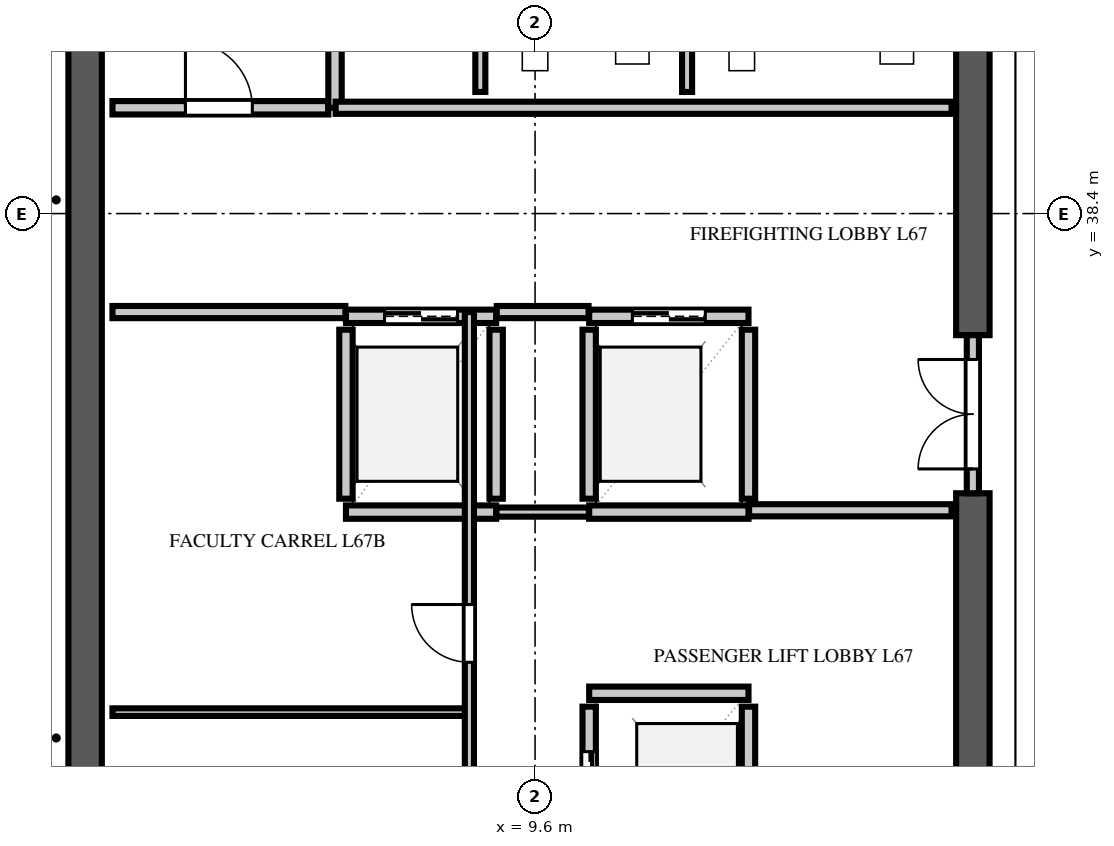
"""IFC4 building model, lengths in metres.
Left out: names, types, materials, properties, quantities, classifications, styles, units other than length and angle.
Written with IfcOpenShell. Run it as: python <this file> out.ifc"""

import sys

from ifc_helpers import new_model, si_unit, direction, frame, frame_2d, origin, place, context, subcontext, project, spatial, rectangle, extrude, element, fill, save


model = new_model("IFC4")
c1 = context("Model", 3, precision=1e-05, world=origin(), true_north=direction((0.0, 1.0)))
c2 = subcontext(c1, "Body", "Model", "MODEL_VIEW")
j1 = project(units=[si_unit("LENGTHUNIT", "METRE"), si_unit("PLANEANGLEUNIT", "RADIAN")], contexts=[c1])
p1 = place(None, origin())
s1 = spatial("IfcSite", under=j1, at=p1, CompositionType="ELEMENT")
p2 = place(p1, origin())
s2 = spatial("IfcBuilding", under=s1, at=p2, CompositionType="ELEMENT")
p3 = place(p2, frame((0.0, 0.0, 265.8)))
s3 = spatial("IfcBuildingStorey", under=s2, at=p3, CompositionType="ELEMENT", Elevation=265.8)
p4 = place(p3, frame((2.2, 9.325, 0.0), z_axis=(0.0, 0.0, 1.0), x_axis=(0.0, 1.0, 0.0)))
e1 = element("IfcWall", 1, at=p4, inside=s3, PredefinedType="SHEAR", context=c2, shape_type="SweptSolid", body=[
    extrude(rectangle(XDim=38.95, YDim=0.55, at=frame_2d((19.475, 0.0))), origin(), (0.0, 0.0, 1.0), 3.54),
])
p5 = place(p3, frame((16.8, 26.0, 0.0), z_axis=(0.0, 0.0, 1.0), x_axis=(0.0, 1.0, 0.0)))
e2 = element("IfcWall", 2, at=p5, inside=s3, PredefinedType="SHEAR", context=c2, shape_type="SweptSolid", body=[
    extrude(rectangle(XDim=7.8, YDim=0.55, at=frame_2d((3.9, 0.0))), origin(), (0.0, 0.0, 1.0), 3.54),
])
p6 = place(p3, frame((16.8, 36.4, 0.0), z_axis=(0.0, 0.0, 1.0), x_axis=(0.0, 1.0, 0.0)))
e3 = element("IfcWall", 3, at=p6, inside=s3, PredefinedType="SHEAR", context=c2, shape_type="SweptSolid", body=[
    extrude(rectangle(XDim=11.325, YDim=0.55, at=frame_2d((5.663, 0.0))), origin(), (0.0, 0.0, 1.0), 3.54),
])
p7 = place(p6, frame((9.2, 0.0, 0.0)))
e4 = element("IfcOpeningElement", 4, at=p7, cuts=e3, PredefinedType="OPENING", context=c2, shape_type="SweptSolid", body=[
    extrude(rectangle(XDim=0.95, YDim=2.15, at=frame_2d((0.475, 1.075))), frame((0.0, 0.287, 0.0), z_axis=(0.0, -1.0, 0.0), x_axis=(1.0, 0.0, 0.0)), (0.0, 0.0, 1.0), 0.574),
])
p8 = place(p3, frame((2.65, 40.14, 0.0), z_axis=(0.0, 0.0, 1.0), x_axis=(1.0, 0.0, 0.0)))
e5 = element("IfcWall", 5, at=p8, inside=s3, PredefinedType="SOLIDWALL", context=c2, shape_type="SweptSolid", body=[
    extrude(rectangle(XDim=3.55, YDim=0.22, at=frame_2d((1.775, 0.0))), origin(), (0.0, 0.0, 1.0), 3.54),
])
p9 = place(p8, frame((1.2, 0.0, 0.0)))
e6 = element("IfcOpeningElement", 6, at=p9, cuts=e5, PredefinedType="OPENING", context=c2, shape_type="SweptSolid", body=[
    extrude(rectangle(XDim=1.1, YDim=2.2, at=frame_2d((0.55, 1.1))), frame((0.0, 0.122, 0.0), z_axis=(0.0, -1.0, 0.0), x_axis=(1.0, 0.0, 0.0)), (0.0, 0.0, 1.0), 0.244),
])
p10 = place(p3, frame((6.31, 40.14, 0.0), z_axis=(0.0, 0.0, 1.0), x_axis=(0.0, 1.0, 0.0)))
e7 = element("IfcWall", 7, at=p10, inside=s3, PredefinedType="SOLIDWALL", context=c2, shape_type="SweptSolid", body=[
    extrude(rectangle(XDim=7.81, YDim=0.22, at=frame_2d((3.905, 0.0))), origin(), (0.0, 0.0, 1.0), 3.54),
])
p11 = place(p3, frame((10.49, 27.71, 0.0), z_axis=(0.0, 0.0, 1.0), x_axis=(0.0, 1.0, 0.0)))
e8 = element("IfcWall", 8, at=p11, inside=s3, PredefinedType="SOLIDWALL", context=c2, shape_type="SweptSolid", body=[
    extrude(rectangle(XDim=2.58, YDim=0.22, at=frame_2d((1.29, 0.0))), origin(), (0.0, 0.0, 1.0), 3.54),
])
p12 = place(p11, frame((0.74, 0.0, 0.0)))
e9 = element("IfcOpeningElement", 9, at=p12, cuts=e8, PredefinedType="OPENING", context=c2, shape_type="SweptSolid", body=[
    extrude(rectangle(XDim=1.1, YDim=2.2, at=frame_2d((0.55, 1.1))), frame((0.0, 0.122, 0.0), z_axis=(0.0, -1.0, 0.0), x_axis=(1.0, 0.0, 0.0)), (0.0, 0.0, 1.0), 0.244),
])
p13 = place(p3, frame((13.11, 27.71, 0.0), z_axis=(0.0, 0.0, 1.0), x_axis=(0.0, 1.0, 0.0)))
e10 = element("IfcWall", 10, at=p13, inside=s3, PredefinedType="SOLIDWALL", context=c2, shape_type="SweptSolid", body=[
    extrude(rectangle(XDim=2.58, YDim=0.22, at=frame_2d((1.29, 0.0))), origin(), (0.0, 0.0, 1.0), 3.54),
])
p14 = place(p3, frame((10.49, 30.51, 0.0), z_axis=(0.0, 0.0, 1.0), x_axis=(1.0, 0.0, 0.0)))
e11 = element("IfcWall", 11, at=p14, inside=s3, PredefinedType="SOLIDWALL", context=c2, shape_type="SweptSolid", body=[
    extrude(rectangle(XDim=2.62, YDim=0.22, at=frame_2d((1.31, 0.0))), origin(), (0.0, 0.0, 1.0), 3.54),
])
for number, where, z_axis, x_axis in (
    (12, (6.49, 33.71, 0.0), (0.0, 0.0, 1.0), (0.0, 1.0, 0.0)),
    (13, (8.96, 33.71, 0.0), (0.0, 0.0, 1.0), (0.0, 1.0, 0.0)),
):
    element("IfcWall", number, at=place(p3, frame(where, z_axis=z_axis, x_axis=x_axis)), inside=s3, PredefinedType="SOLIDWALL", context=c2, shape_type="SweptSolid", body=[
        extrude(rectangle(XDim=2.78, YDim=0.22, at=frame_2d((1.39, 0.0))), origin(), (0.0, 0.0, 1.0), 3.54),
    ])
p15 = place(p3, frame((6.49, 33.49, 0.0), z_axis=(0.0, 0.0, 1.0), x_axis=(1.0, 0.0, 0.0)))
e14 = element("IfcWall", 14, at=p15, inside=s3, PredefinedType="SOLIDWALL", context=c2, shape_type="SweptSolid", body=[
    extrude(rectangle(XDim=2.47, YDim=0.22, at=frame_2d((1.235, 0.0))), origin(), (0.0, 0.0, 1.0), 3.54),
])
p16 = place(p3, frame((6.49, 36.71, 0.0), z_axis=(0.0, 0.0, 1.0), x_axis=(1.0, 0.0, 0.0)))
e15 = element("IfcWall", 15, at=p16, inside=s3, PredefinedType="SOLIDWALL", context=c2, shape_type="SweptSolid", body=[
    extrude(rectangle(XDim=2.47, YDim=0.22, at=frame_2d((1.235, 0.0))), origin(), (0.0, 0.0, 1.0), 3.54),
])
p17 = place(p16, frame((0.635, 0.0, 0.0)))
e16 = element("IfcOpeningElement", 16, at=p17, cuts=e15, PredefinedType="OPENING", context=c2, shape_type="SweptSolid", body=[
    extrude(rectangle(XDim=1.2, YDim=2.2, at=frame_2d((0.6, 1.1))), frame((0.0, 0.122, 0.0), z_axis=(0.0, -1.0, 0.0), x_axis=(1.0, 0.0, 0.0)), (0.0, 0.0, 1.0), 0.244),
])
for number, where, z_axis, x_axis in (
    (17, (10.49, 33.71, 0.0), (0.0, 0.0, 1.0), (0.0, 1.0, 0.0)),
    (18, (13.11, 33.71, 0.0), (0.0, 0.0, 1.0), (0.0, 1.0, 0.0)),
):
    element("IfcWall", number, at=place(p3, frame(where, z_axis=z_axis, x_axis=x_axis)), inside=s3, PredefinedType="SOLIDWALL", context=c2, shape_type="SweptSolid", body=[
        extrude(rectangle(XDim=2.78, YDim=0.22, at=frame_2d((1.39, 0.0))), origin(), (0.0, 0.0, 1.0), 3.54),
    ])
p18 = place(p3, frame((10.49, 33.49, 0.0), z_axis=(0.0, 0.0, 1.0), x_axis=(1.0, 0.0, 0.0)))
e19 = element("IfcWall", 19, at=p18, inside=s3, PredefinedType="SOLIDWALL", context=c2, shape_type="SweptSolid", body=[
    extrude(rectangle(XDim=2.62, YDim=0.22, at=frame_2d((1.31, 0.0))), origin(), (0.0, 0.0, 1.0), 3.54),
])
p19 = place(p3, frame((10.49, 36.71, 0.0), z_axis=(0.0, 0.0, 1.0), x_axis=(1.0, 0.0, 0.0)))
e20 = element("IfcWall", 20, at=p19, inside=s3, PredefinedType="SOLIDWALL", context=c2, shape_type="SweptSolid", body=[
    extrude(rectangle(XDim=2.62, YDim=0.22, at=frame_2d((1.31, 0.0))), origin(), (0.0, 0.0, 1.0), 3.54),
])
p20 = place(p19, frame((0.71, 0.0, 0.0)))
e21 = element("IfcOpeningElement", 21, at=p20, cuts=e20, PredefinedType="OPENING", context=c2, shape_type="SweptSolid", body=[
    extrude(rectangle(XDim=1.2, YDim=2.2, at=frame_2d((0.6, 1.1))), frame((0.0, 0.122, 0.0), z_axis=(0.0, -1.0, 0.0), x_axis=(1.0, 0.0, 0.0)), (0.0, 0.0, 1.0), 0.244),
])
p21 = place(p3, frame((2.65, 36.78, 0.0), z_axis=(0.0, 0.0, 1.0), x_axis=(1.0, 0.0, 0.0)))
e22 = element("IfcWall", 22, at=p21, inside=s3, PredefinedType="SOLIDWALL", context=c2, shape_type="SweptSolid", body=[
    extrude(rectangle(XDim=3.83, YDim=0.2, at=frame_2d((1.915, 0.0))), origin(), (0.0, 0.0, 1.0), 3.54),
])
p22 = place(p3, frame((8.97, 36.78, 0.0), z_axis=(0.0, 0.0, 1.0), x_axis=(1.0, 0.0, 0.0)))
e23 = element("IfcWall", 23, at=p22, inside=s3, PredefinedType="SOLIDWALL", context=c2, shape_type="SweptSolid", body=[
    extrude(rectangle(XDim=1.51, YDim=0.2, at=frame_2d((0.755, 0.0))), origin(), (0.0, 0.0, 1.0), 3.54),
])
p23 = place(p3, frame((13.12, 33.52, 0.0), z_axis=(0.0, 0.0, 1.0), x_axis=(1.0, 0.0, 0.0)))
e24 = element("IfcWall", 24, at=p23, inside=s3, PredefinedType="SOLIDWALL", context=c2, shape_type="SweptSolid", body=[
    extrude(rectangle(XDim=3.33, YDim=0.2, at=frame_2d((1.665, 0.0))), origin(), (0.0, 0.0, 1.0), 3.54),
])
p24 = place(p3, frame((6.32, 40.14, 0.0), z_axis=(0.0, 0.0, 1.0), x_axis=(1.0, 0.0, 0.0)))
e25 = element("IfcWall", 25, at=p24, inside=s3, PredefinedType="SOLIDWALL", context=c2, shape_type="SweptSolid", body=[
    extrude(rectangle(XDim=10.13, YDim=0.2, at=frame_2d((5.065, 0.0))), origin(), (0.0, 0.0, 1.0), 3.54),
])
p25 = place(p3, frame((16.8, 33.8, 0.0), z_axis=(0.0, 0.0, 1.0), x_axis=(0.0, 1.0, 0.0)))
e26 = element("IfcWall", 26, at=p25, inside=s3, PredefinedType="SOLIDWALL", context=c2, shape_type="SweptSolid", body=[
    extrude(rectangle(XDim=2.6, YDim=0.2, at=frame_2d((1.3, 0.0))), origin(), (0.0, 0.0, 1.0), 3.54),
])
p26 = place(p25, frame((0.4, 0.0, 0.0)))
e27 = element("IfcOpeningElement", 27, at=p26, cuts=e26, PredefinedType="OPENING", context=c2, shape_type="SweptSolid", body=[
    extrude(rectangle(XDim=1.8, YDim=2.2, at=frame_2d((0.9, 1.1))), frame((0.0, 0.112, 0.0), z_axis=(0.0, -1.0, 0.0), x_axis=(1.0, 0.0, 0.0)), (0.0, 0.0, 1.0), 0.224),
])
p27 = place(p3, frame((8.965, 33.49, 0.0), z_axis=(0.0, 0.0, 1.0), x_axis=(1.0, 0.0, 0.0)))
e28 = element("IfcWall", 28, at=p27, inside=s3, PredefinedType="PARTITIONING", context=c2, shape_type="SweptSolid", body=[
    extrude(rectangle(XDim=1.52, YDim=0.15, at=frame_2d((0.76, 0.0))), origin(), (0.0, 0.0, 1.0), 3.54),
])
p28 = place(p3, frame((2.65, 30.2, 0.0), z_axis=(0.0, 0.0, 1.0), x_axis=(1.0, 0.0, 0.0)))
e29 = element("IfcWall", 29, at=p28, inside=s3, PredefinedType="PARTITIONING", context=c2, shape_type="SweptSolid", body=[
    extrude(rectangle(XDim=5.87, YDim=0.125, at=frame_2d((2.935, 0.0))), origin(), (0.0, 0.0, 1.0), 3.54),
])
p29 = place(p3, frame((8.52, 12.02, 0.0), z_axis=(0.0, 0.0, 1.0), x_axis=(0.0, 1.0, 0.0)))
e30 = element("IfcWall", 30, at=p29, inside=s3, PredefinedType="PARTITIONING", context=c2, shape_type="SweptSolid", body=[
    extrude(rectangle(XDim=24.76, YDim=0.15, at=frame_2d((12.38, 0.0))), origin(), (0.0, 0.0, 1.0), 3.54),
])
p30 = place(p29, frame((8.0, 0.0, 0.0)))
e31 = element("IfcOpeningElement", 31, at=p30, cuts=e30, PredefinedType="OPENING", context=c2, shape_type="SweptSolid", body=[
    extrude(rectangle(XDim=0.95, YDim=2.15, at=frame_2d((0.475, 1.075))), frame((0.0, 0.087, 0.0), z_axis=(0.0, -1.0, 0.0), x_axis=(1.0, 0.0, 0.0)), (0.0, 0.0, 1.0), 0.174),
])
p31 = place(p29, frame((19.0, 0.0, 0.0)))
e32 = element("IfcOpeningElement", 32, at=p31, cuts=e30, PredefinedType="OPENING", context=c2, shape_type="SweptSolid", body=[
    extrude(rectangle(XDim=0.95, YDim=2.15, at=frame_2d((0.475, 1.075))), frame((0.0, 0.087, 0.0), z_axis=(0.0, -1.0, 0.0), x_axis=(1.0, 0.0, 0.0)), (0.0, 0.0, 1.0), 0.174),
])
for number, where, z_axis, x_axis in (
    (33, (8.7, 40.4, 0.0), (0.0, 0.0, 1.0), (0.0, 1.0, 0.0)),
    (34, (12.1, 40.4, 0.0), (0.0, 0.0, 1.0), (0.0, 1.0, 0.0)),
):
    element("IfcWall", number, at=place(p3, frame(where, z_axis=z_axis, x_axis=x_axis)), inside=s3, PredefinedType="PLUMBINGWALL", context=c2, shape_type="SweptSolid", body=[
        extrude(rectangle(XDim=4.92, YDim=0.165, at=frame_2d((2.46, 0.0))), origin(), (0.0, 0.0, 1.0), 3.54),
    ])
p32 = place(p9, origin())
e35 = element("IfcDoor", 35, at=p32, inside=s3, OperationType="SINGLE_SWING_LEFT", PredefinedType="DOOR", context=c2, shape_type="SweptSolid", body=[
    extrude(rectangle(XDim=1.1, YDim=2.2, at=frame_2d((0.55, 1.1))), frame((0.0, 0.025, 0.0), z_axis=(0.0, -1.0, 0.0), x_axis=(1.0, 0.0, 0.0)), (0.0, 0.0, 1.0), 0.05),
])
fill(e6, e35)
p33 = place(p12, origin())
e36 = element("IfcDoor", 36, at=p33, inside=s3, OperationType="DOUBLE_DOOR_SLIDING", PredefinedType="DOOR", context=c2, shape_type="SweptSolid", body=[
    extrude(rectangle(XDim=1.1, YDim=2.2, at=frame_2d((0.55, 1.1))), frame((0.0, 0.025, 0.0), z_axis=(0.0, -1.0, 0.0), x_axis=(1.0, 0.0, 0.0)), (0.0, 0.0, 1.0), 0.05),
])
fill(e9, e36)
p34 = place(p17, origin())
e37 = element("IfcDoor", 37, at=p34, inside=s3, OperationType="DOUBLE_DOOR_SLIDING", PredefinedType="DOOR", context=c2, shape_type="SweptSolid", body=[
    extrude(rectangle(XDim=1.2, YDim=2.2, at=frame_2d((0.6, 1.1))), frame((0.0, 0.025, 0.0), z_axis=(0.0, -1.0, 0.0), x_axis=(1.0, 0.0, 0.0)), (0.0, 0.0, 1.0), 0.05),
])
fill(e16, e37)
p35 = place(p20, origin())
e38 = element("IfcDoor", 38, at=p35, inside=s3, OperationType="DOUBLE_DOOR_SLIDING", PredefinedType="DOOR", context=c2, shape_type="SweptSolid", body=[
    extrude(rectangle(XDim=1.2, YDim=2.2, at=frame_2d((0.6, 1.1))), frame((0.0, 0.025, 0.0), z_axis=(0.0, -1.0, 0.0), x_axis=(1.0, 0.0, 0.0)), (0.0, 0.0, 1.0), 0.05),
])
fill(e21, e38)
p36 = place(p26, origin())
e39 = element("IfcDoor", 39, at=p36, inside=s3, OperationType="DOUBLE_DOOR_SINGLE_SWING", PredefinedType="DOOR", context=c2, shape_type="SweptSolid", body=[
    extrude(rectangle(XDim=1.8, YDim=2.2, at=frame_2d((0.9, 1.1))), frame((0.0, 0.025, 0.0), z_axis=(0.0, -1.0, 0.0), x_axis=(1.0, 0.0, 0.0)), (0.0, 0.0, 1.0), 0.05),
])
fill(e27, e39)
p37 = place(p31, origin())
e40 = element("IfcDoor", 40, at=p37, inside=s3, OperationType="SINGLE_SWING_RIGHT", PredefinedType="DOOR", context=c2, shape_type="SweptSolid", body=[
    extrude(rectangle(XDim=0.95, YDim=2.15, at=frame_2d((0.475, 1.075))), frame((0.0, 0.025, 0.0), z_axis=(0.0, -1.0, 0.0), x_axis=(1.0, 0.0, 0.0)), (0.0, 0.0, 1.0), 0.05),
])
fill(e32, e40)
save(model, sys.argv[1])
